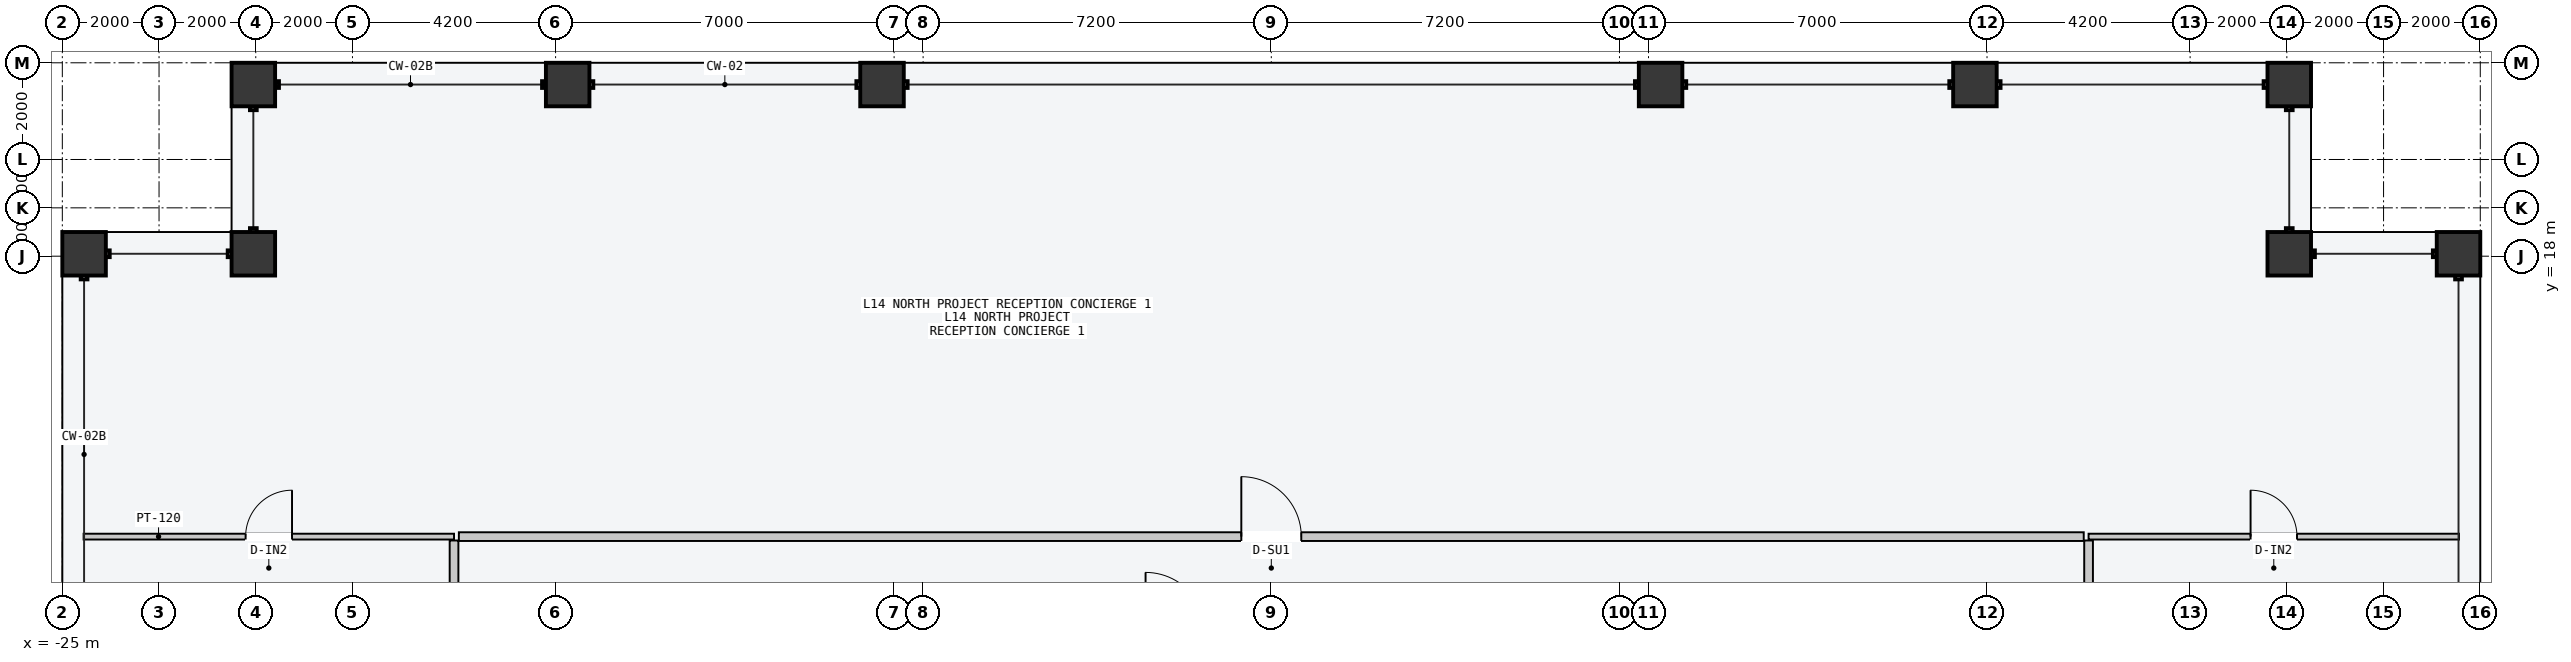
"""IFC4 building model, lengths in metres.
Left out: names, types, materials, properties, quantities, classifications, styles, units other than length and angle.
Written with IfcOpenShell. Run it as: python <this file> out.ifc"""

import sys

from ifc_helpers import new_model, si_unit, direction, frame, frame_2d, origin, origin_2d, place, context, subcontext, project, spatial, rectangle, hollow_rectangle, extrude, element, fill, save


model = new_model("IFC4")
c1 = context("Model", 3, precision=1e-05, world=origin(), true_north=direction((0.0, 1.0)))
c2 = subcontext(c1, "Body", "Model", "MODEL_VIEW")
j1 = project(units=[si_unit("LENGTHUNIT", "METRE"), si_unit("PLANEANGLEUNIT", "RADIAN")], contexts=[c1])
p1 = place(None, origin())
s1 = spatial("IfcSite", under=j1, at=p1, CompositionType="ELEMENT")
p2 = place(p1, origin())
s2 = spatial("IfcBuilding", under=s1, at=p2, CompositionType="ELEMENT")
p3 = place(p2, frame((0.0, 0.0, 56.4)))
s3 = spatial("IfcBuildingStorey", under=s2, at=p3, CompositionType="ELEMENT", Elevation=56.4)
for number, where, z_axis, x_axis in (
    (1, (-21.05, 21.55, 0.0), (0.0, 0.0, 1.0), (1.0, 0.0, 0.0)),
    (2, (-14.55, 21.55, 0.0), (0.0, 0.0, 1.0), (1.0, 0.0, 0.0)),
    (3, (-8.05, 21.55, 0.0), (0.0, 0.0, 1.0), (1.0, 0.0, 0.0)),
    (4, (8.05, 21.55, 0.0), (0.0, 0.0, 1.0), (1.0, 0.0, 0.0)),
    (5, (14.55, 21.55, 0.0), (0.0, 0.0, 1.0), (1.0, 0.0, 0.0)),
    (6, (21.05, 21.55, 0.0), (0.0, 0.0, 1.0), (1.0, 0.0, 0.0)),
    (7, (-24.55, 18.05, 0.0), (0.0, 0.0, 1.0), (0.0, 1.0, 0.0)),
    (8, (24.55, 18.05, 0.0), (0.0, 0.0, 1.0), (0.0, 1.0, 0.0)),
    (9, (-21.05, 18.05, 0.0), (0.0, 0.0, 1.0), (1.0, 0.0, 0.0)),
    (10, (21.05, 18.05, 0.0), (0.0, 0.0, 1.0), (1.0, 0.0, 0.0)),
):
    element("IfcColumn", number, at=place(p3, frame(where, z_axis=z_axis, x_axis=x_axis)), inside=s3, PredefinedType="COLUMN", context=c2, shape_type="SweptSolid", body=[
        extrude(hollow_rectangle(XDim=0.9, YDim=0.9, WallThickness=0.045, at=origin_2d()), origin(), (0.0, 0.0, 1.0), 3.6),
    ])
p4 = place(p3, frame((-16.8, 12.2, 0.0), z_axis=(0.0, 0.0, 1.0), x_axis=(1.0, 0.0, 0.0)))
e11 = element("IfcWall", 11, at=p4, inside=s3, PredefinedType="PARTITIONING", context=c2, shape_type="SweptSolid", body=[
    extrude(rectangle(XDim=33.6, YDim=0.18, at=frame_2d((16.8, 0.0))), origin(), (0.0, 0.0, 1.0), 3.4),
])
p5 = place(p4, frame((16.18, 0.0, 0.0)))
e12 = element("IfcOpeningElement", 12, at=p5, cuts=e11, PredefinedType="OPENING", context=c2, shape_type="SweptSolid", body=[
    extrude(rectangle(XDim=1.24, YDim=2.24, at=frame_2d((0.62, 1.12))), frame((0.0, 0.1, 0.0), z_axis=(0.0, -1.0, 0.0), x_axis=(1.0, 0.0, 0.0)), (0.0, 0.0, 1.0), 0.2),
])
p6 = place(p3, frame((-24.56, 12.2, 0.0), z_axis=(0.0, 0.0, 1.0), x_axis=(1.0, 0.0, 0.0)))
e13 = element("IfcWall", 13, at=p6, inside=s3, PredefinedType="PARTITIONING", context=c2, shape_type="SweptSolid", body=[
    extrude(rectangle(XDim=7.66, YDim=0.12, at=frame_2d((3.83, 0.0))), origin(), (0.0, 0.0, 1.0), 3.4),
])
p7 = place(p6, frame((3.35, 0.0, 0.0)))
e14 = element("IfcOpeningElement", 14, at=p7, cuts=e13, PredefinedType="OPENING", context=c2, shape_type="SweptSolid", body=[
    extrude(rectangle(XDim=0.96, YDim=2.18, at=frame_2d((0.48, 1.09))), frame((0.0, 0.07, 0.0), z_axis=(0.0, -1.0, 0.0), x_axis=(1.0, 0.0, 0.0)), (0.0, 0.0, 1.0), 0.14),
])
p8 = place(p3, frame((16.9, 12.2, 0.0), z_axis=(0.0, 0.0, 1.0), x_axis=(1.0, 0.0, 0.0)))
e15 = element("IfcWall", 15, at=p8, inside=s3, PredefinedType="PARTITIONING", context=c2, shape_type="SweptSolid", body=[
    extrude(rectangle(XDim=7.66, YDim=0.12, at=frame_2d((3.83, 0.0))), origin(), (0.0, 0.0, 1.0), 3.4),
])
p9 = place(p8, frame((3.35, 0.0, 0.0)))
e16 = element("IfcOpeningElement", 16, at=p9, cuts=e15, PredefinedType="OPENING", context=c2, shape_type="SweptSolid", body=[
    extrude(rectangle(XDim=0.96, YDim=2.18, at=frame_2d((0.48, 1.09))), frame((0.0, 0.07, 0.0), z_axis=(0.0, -1.0, 0.0), x_axis=(1.0, 0.0, 0.0)), (0.0, 0.0, 1.0), 0.14),
])
p10 = place(p3, frame((-16.9, -14.42, 0.0), z_axis=(0.0, 0.0, 1.0), x_axis=(0.0, 1.0, 0.0)))
e17 = element("IfcWall", 17, at=p10, inside=s3, PredefinedType="PARTITIONING", context=c2, shape_type="SweptSolid", body=[
    extrude(rectangle(XDim=26.54, YDim=0.18, at=frame_2d((13.27, 0.0))), origin(), (0.0, 0.0, 1.0), 3.4),
])
p11 = place(p10, frame((4.873, 0.0, 0.0)))
e18 = element("IfcOpeningElement", 18, at=p11, cuts=e17, PredefinedType="OPENING", context=c2, shape_type="SweptSolid", body=[
    extrude(rectangle(XDim=1.4, YDim=2.2, at=frame_2d((0.7, 1.1))), frame((0.0, 0.1, 0.0), z_axis=(0.0, -1.0, 0.0), x_axis=(1.0, 0.0, 0.0)), (0.0, 0.0, 1.0), 0.2),
])
p12 = place(p10, frame((18.393, 0.0, 0.0)))
e19 = element("IfcOpeningElement", 19, at=p12, cuts=e17, PredefinedType="OPENING", context=c2, shape_type="SweptSolid", body=[
    extrude(rectangle(XDim=0.9, YDim=2.15, at=frame_2d((0.45, 1.075))), frame((0.0, 0.1, 0.0), z_axis=(0.0, -1.0, 0.0), x_axis=(1.0, 0.0, 0.0)), (0.0, 0.0, 1.0), 0.2),
])
p13 = place(p3, frame((16.9, -14.42, 0.0), z_axis=(0.0, 0.0, 1.0), x_axis=(0.0, 1.0, 0.0)))
e20 = element("IfcWall", 20, at=p13, inside=s3, PredefinedType="PARTITIONING", context=c2, shape_type="SweptSolid", body=[
    extrude(rectangle(XDim=26.54, YDim=0.18, at=frame_2d((13.27, 0.0))), origin(), (0.0, 0.0, 1.0), 3.4),
])
p14 = place(p13, frame((2.352, 0.0, 0.0)))
e21 = element("IfcOpeningElement", 21, at=p14, cuts=e20, PredefinedType="OPENING", context=c2, shape_type="SweptSolid", body=[
    extrude(rectangle(XDim=1.4, YDim=2.2, at=frame_2d((0.7, 1.1))), frame((0.0, 0.1, 0.0), z_axis=(0.0, -1.0, 0.0), x_axis=(1.0, 0.0, 0.0)), (0.0, 0.0, 1.0), 0.2),
])
p15 = place(p13, frame((10.166, 0.0, 0.0)))
e22 = element("IfcOpeningElement", 22, at=p15, cuts=e20, PredefinedType="OPENING", context=c2, shape_type="SweptSolid", body=[
    extrude(rectangle(XDim=0.9, YDim=2.15, at=frame_2d((0.45, 1.075))), frame((0.0, 0.1, 0.0), z_axis=(0.0, -1.0, 0.0), x_axis=(1.0, 0.0, 0.0)), (0.0, 0.0, 1.0), 0.2),
])
p16 = place(p13, frame((20.354, 0.0, 0.0)))
e23 = element("IfcOpeningElement", 23, at=p16, cuts=e20, PredefinedType="OPENING", context=c2, shape_type="SweptSolid", body=[
    extrude(rectangle(XDim=0.96, YDim=2.18, at=frame_2d((0.48, 1.09))), frame((0.0, 0.1, 0.0), z_axis=(0.0, -1.0, 0.0), x_axis=(1.0, 0.0, 0.0)), (0.0, 0.0, 1.0), 0.2),
])
p17 = place(p5, origin())
e24 = element("IfcDoor", 24, at=p17, inside=s3, OperationType="SINGLE_SWING_LEFT", PredefinedType="DOOR", context=c2, shape_type="SweptSolid", body=[
    extrude(rectangle(XDim=1.24, YDim=2.24, at=frame_2d((0.62, 1.12))), frame((0.0, 0.025, 0.0), z_axis=(0.0, -1.0, 0.0), x_axis=(1.0, 0.0, 0.0)), (0.0, 0.0, 1.0), 0.05),
])
fill(e12, e24)
p18 = place(p7, origin())
e25 = element("IfcDoor", 25, at=p18, inside=s3, OperationType="SINGLE_SWING_RIGHT", PredefinedType="DOOR", context=c2, shape_type="SweptSolid", body=[
    extrude(rectangle(XDim=0.96, YDim=2.18, at=frame_2d((0.48, 1.09))), frame((0.0, 0.025, 0.0), z_axis=(0.0, -1.0, 0.0), x_axis=(1.0, 0.0, 0.0)), (0.0, 0.0, 1.0), 0.05),
])
fill(e14, e25)
p19 = place(p9, origin())
e26 = element("IfcDoor", 26, at=p19, inside=s3, OperationType="SINGLE_SWING_LEFT", PredefinedType="DOOR", context=c2, shape_type="SweptSolid", body=[
    extrude(rectangle(XDim=0.96, YDim=2.18, at=frame_2d((0.48, 1.09))), frame((0.0, 0.025, 0.0), z_axis=(0.0, -1.0, 0.0), x_axis=(1.0, 0.0, 0.0)), (0.0, 0.0, 1.0), 0.05),
])
fill(e16, e26)
save(model, sys.argv[1])
